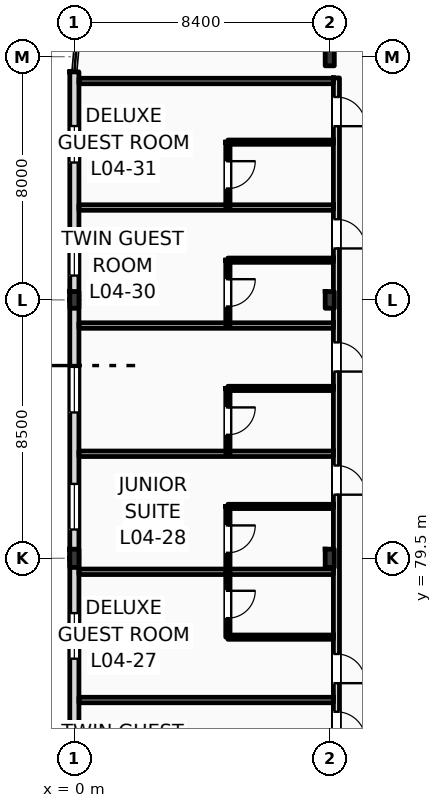
"""IFC4 building model, lengths in metres.
Left out: names, types, materials, properties, quantities, classifications, styles, units other than length and angle.
Written with IfcOpenShell. Run it as: python <this file> out.ifc"""

import sys

from ifc_helpers import new_model, si_unit, direction, frame, frame_2d, origin, origin_2d, place, context, subcontext, project, spatial, rectangle, i_section, extrude, element, fill, save


model = new_model("IFC4")
c1 = context("Model", 3, precision=1e-05, world=origin(), true_north=direction((0.0, 1.0)))
c2 = subcontext(c1, "Body", "Model", "MODEL_VIEW")
j1 = project(units=[si_unit("LENGTHUNIT", "METRE"), si_unit("PLANEANGLEUNIT", "RADIAN")], contexts=[c1])
p1 = place(None, origin())
s1 = spatial("IfcSite", under=j1, at=p1, CompositionType="ELEMENT")
p2 = place(p1, origin())
s2 = spatial("IfcBuilding", under=s1, at=p2, CompositionType="ELEMENT")
p3 = place(p2, frame((0.0, 0.0, 20.4)))
s3 = spatial("IfcBuildingStorey", under=s2, at=p3, CompositionType="ELEMENT", Elevation=20.4)
p4 = place(p3, frame((0.0, 79.5, 0.0), z_axis=(0.0, 0.0, 1.0), x_axis=(1.0, 0.0, 0.0)))
e1 = element("IfcColumn", 1, at=p4, inside=s3, PredefinedType="COLUMN", context=c2, shape_type="SweptSolid", body=[
    extrude(i_section(OverallWidth=0.3, OverallDepth=0.6, WebThickness=0.015, FlangeThickness=0.03, FilletRadius=0.027, at=origin_2d()), origin(), (0.0, 0.0, 1.0), 4.2),
])
p5 = place(p3, frame((0.0, 88.0, 0.0), z_axis=(0.0, 0.0, 1.0), x_axis=(1.0, 0.0, 0.0)))
e2 = element("IfcColumn", 2, at=p5, inside=s3, PredefinedType="COLUMN", context=c2, shape_type="SweptSolid", body=[
    extrude(i_section(OverallWidth=0.3, OverallDepth=0.55, WebThickness=0.015, FlangeThickness=0.029, FilletRadius=0.027, at=origin_2d()), origin(), (0.0, 0.0, 1.0), 4.2),
])
p6 = place(p3, frame((8.4, 79.5, 0.0), z_axis=(0.0, 0.0, 1.0), x_axis=(1.0, 0.0, 0.0)))
e3 = element("IfcColumn", 3, at=p6, inside=s3, PredefinedType="COLUMN", context=c2, shape_type="SweptSolid", body=[
    extrude(i_section(OverallWidth=0.3, OverallDepth=0.6, WebThickness=0.015, FlangeThickness=0.03, FilletRadius=0.027, at=origin_2d()), origin(), (0.0, 0.0, 1.0), 4.2),
])
p7 = place(p3, frame((8.4, 88.0, 0.0), z_axis=(0.0, 0.0, 1.0), x_axis=(1.0, 0.0, 0.0)))
e4 = element("IfcColumn", 4, at=p7, inside=s3, PredefinedType="COLUMN", context=c2, shape_type="SweptSolid", body=[
    extrude(i_section(OverallWidth=0.3, OverallDepth=0.55, WebThickness=0.015, FlangeThickness=0.029, FilletRadius=0.027, at=origin_2d()), origin(), (0.0, 0.0, 1.0), 4.2),
])
p8 = place(p3, frame((8.4, 96.0, 0.0), z_axis=(0.0, 0.0, 1.0), x_axis=(1.0, 0.0, 0.0)))
e5 = element("IfcColumn", 5, at=p8, inside=s3, PredefinedType="COLUMN", context=c2, shape_type="SweptSolid", body=[
    extrude(i_section(OverallWidth=0.3, OverallDepth=0.6, WebThickness=0.015, FlangeThickness=0.03, FilletRadius=0.027, at=origin_2d()), origin(), (0.0, 0.0, 1.0), 4.2),
])
p9 = place(p3, frame((0.0, 71.0, 0.0), z_axis=(0.0, 0.0, 1.0), x_axis=(0.0, 1.0, 0.0)))
e6 = element("IfcWall", 6, at=p9, inside=s3, PredefinedType="STANDARD", context=c2, shape_type="SweptSolid", body=[
    extrude(rectangle(XDim=8.5, YDim=0.3, at=frame_2d((4.25, 0.0))), origin(), (0.0, 0.0, 1.0), 3.53),
])
p10 = place(p9, frame((1.147, 0.0, 0.9)))
e7 = element("IfcOpeningElement", 7, at=p10, cuts=e6, PredefinedType="OPENING", context=c2, shape_type="SweptSolid", body=[
    extrude(rectangle(XDim=1.5, YDim=2.45, at=frame_2d((0.75, 1.225))), frame((0.0, 0.16, 0.0), z_axis=(0.0, -1.0, 0.0), x_axis=(1.0, 0.0, 0.0)), (0.0, 0.0, 1.0), 0.32),
])
p11 = place(p9, frame((5.197, 0.0, 0.9)))
e8 = element("IfcOpeningElement", 8, at=p11, cuts=e6, PredefinedType="OPENING", context=c2, shape_type="SweptSolid", body=[
    extrude(rectangle(XDim=1.5, YDim=2.45, at=frame_2d((0.75, 1.225))), frame((0.0, 0.16, 0.0), z_axis=(0.0, -1.0, 0.0), x_axis=(1.0, 0.0, 0.0)), (0.0, 0.0, 1.0), 0.32),
])
p12 = place(p3, frame((0.0, 79.5, 0.0), z_axis=(0.0, 0.0, 1.0), x_axis=(0.0, 1.0, 0.0)))
e9 = element("IfcWall", 9, at=p12, inside=s3, PredefinedType="STANDARD", context=c2, shape_type="SweptSolid", body=[
    extrude(rectangle(XDim=8.5, YDim=0.3, at=frame_2d((4.25, 0.0))), origin(), (0.0, 0.0, 1.0), 3.53),
])
p13 = place(p12, frame((0.947, 0.0, 0.9)))
e10 = element("IfcOpeningElement", 10, at=p13, cuts=e9, PredefinedType="OPENING", context=c2, shape_type="SweptSolid", body=[
    extrude(rectangle(XDim=1.5, YDim=2.45, at=frame_2d((0.75, 1.225))), frame((0.0, 0.16, 0.0), z_axis=(0.0, -1.0, 0.0), x_axis=(1.0, 0.0, 0.0)), (0.0, 0.0, 1.0), 0.32),
])
p14 = place(p12, frame((4.797, 0.0, 0.9)))
e11 = element("IfcOpeningElement", 11, at=p14, cuts=e9, PredefinedType="OPENING", context=c2, shape_type="SweptSolid", body=[
    extrude(rectangle(XDim=1.5, YDim=2.45, at=frame_2d((0.75, 1.225))), frame((0.0, 0.16, 0.0), z_axis=(0.0, -1.0, 0.0), x_axis=(1.0, 0.0, 0.0)), (0.0, 0.0, 1.0), 0.32),
])
p15 = place(p3, frame((0.0, 88.0, 0.0), z_axis=(0.0, 0.0, 1.0), x_axis=(0.0, 1.0, 0.0)))
e12 = element("IfcWall", 12, at=p15, inside=s3, PredefinedType="STANDARD", context=c2, shape_type="SweptSolid", body=[
    extrude(rectangle(XDim=7.5, YDim=0.3, at=frame_2d((3.75, 0.0))), origin(), (0.0, 0.0, 1.0), 3.94),
])
p16 = place(p15, frame((0.8, 0.0, 0.9)))
e13 = element("IfcOpeningElement", 13, at=p16, cuts=e12, PredefinedType="OPENING", context=c2, shape_type="SweptSolid", body=[
    extrude(rectangle(XDim=1.5, YDim=2.86, at=frame_2d((0.75, 1.43))), frame((0.0, 0.16, 0.0), z_axis=(0.0, -1.0, 0.0), x_axis=(1.0, 0.0, 0.0)), (0.0, 0.0, 1.0), 0.32),
])
p17 = place(p15, frame((4.519, 0.0, 0.9)))
e14 = element("IfcOpeningElement", 14, at=p17, cuts=e12, PredefinedType="OPENING", context=c2, shape_type="SweptSolid", body=[
    extrude(rectangle(XDim=1.2, YDim=1.8, at=frame_2d((0.6, 0.9))), frame((0.0, 0.16, 0.0), z_axis=(0.0, -1.0, 0.0), x_axis=(1.0, 0.0, 0.0)), (0.0, 0.0, 1.0), 0.32),
])
p18 = place(p3, frame((8.62, 62.64, 0.0), z_axis=(0.0, 0.0, 1.0), x_axis=(0.0, 1.0, 0.0)))
e15 = element("IfcWall", 15, at=p18, inside=s3, PredefinedType="PARTITIONING", context=c2, shape_type="SweptSolid", body=[
    extrude(rectangle(XDim=32.66, YDim=0.2, at=frame_2d((16.33, 0.0))), origin(), (0.0, 0.0, 1.0), 3.53),
])
p19 = place(p18, frame((2.724, 0.0, 0.0)))
e16 = element("IfcOpeningElement", 16, at=p19, cuts=e15, PredefinedType="OPENING", context=c2, shape_type="SweptSolid", body=[
    extrude(rectangle(XDim=0.96, YDim=2.2, at=frame_2d((0.48, 1.1))), frame((0.0, 0.11, 0.0), z_axis=(0.0, -1.0, 0.0), x_axis=(1.0, 0.0, 0.0)), (0.0, 0.0, 1.0), 0.22),
])
p20 = place(p18, frame((4.652, 0.0, 0.0)))
e17 = element("IfcOpeningElement", 17, at=p20, cuts=e15, PredefinedType="OPENING", context=c2, shape_type="SweptSolid", body=[
    extrude(rectangle(XDim=0.96, YDim=2.2, at=frame_2d((0.48, 1.1))), frame((0.0, 0.11, 0.0), z_axis=(0.0, -1.0, 0.0), x_axis=(1.0, 0.0, 0.0)), (0.0, 0.0, 1.0), 0.22),
])
p21 = place(p18, frame((10.852, 0.0, 0.0)))
e18 = element("IfcOpeningElement", 18, at=p21, cuts=e15, PredefinedType="OPENING", context=c2, shape_type="SweptSolid", body=[
    extrude(rectangle(XDim=0.96, YDim=2.2, at=frame_2d((0.48, 1.1))), frame((0.0, 0.11, 0.0), z_axis=(0.0, -1.0, 0.0), x_axis=(1.0, 0.0, 0.0)), (0.0, 0.0, 1.0), 0.22),
])
p22 = place(p18, frame((12.752, 0.0, 0.0)))
e19 = element("IfcOpeningElement", 19, at=p22, cuts=e15, PredefinedType="OPENING", context=c2, shape_type="SweptSolid", body=[
    extrude(rectangle(XDim=0.96, YDim=2.2, at=frame_2d((0.48, 1.1))), frame((0.0, 0.11, 0.0), z_axis=(0.0, -1.0, 0.0), x_axis=(1.0, 0.0, 0.0)), (0.0, 0.0, 1.0), 0.22),
])
p23 = place(p18, frame((18.952, 0.0, 0.0)))
e20 = element("IfcOpeningElement", 20, at=p23, cuts=e15, PredefinedType="OPENING", context=c2, shape_type="SweptSolid", body=[
    extrude(rectangle(XDim=0.96, YDim=2.2, at=frame_2d((0.48, 1.1))), frame((0.0, 0.11, 0.0), z_axis=(0.0, -1.0, 0.0), x_axis=(1.0, 0.0, 0.0)), (0.0, 0.0, 1.0), 0.22),
])
p24 = place(p18, frame((23.002, 0.0, 0.0)))
e21 = element("IfcOpeningElement", 21, at=p24, cuts=e15, PredefinedType="OPENING", context=c2, shape_type="SweptSolid", body=[
    extrude(rectangle(XDim=0.96, YDim=2.2, at=frame_2d((0.48, 1.1))), frame((0.0, 0.11, 0.0), z_axis=(0.0, -1.0, 0.0), x_axis=(1.0, 0.0, 0.0)), (0.0, 0.0, 1.0), 0.22),
])
p25 = place(p18, frame((27.052, 0.0, 0.0)))
e22 = element("IfcOpeningElement", 22, at=p25, cuts=e15, PredefinedType="OPENING", context=c2, shape_type="SweptSolid", body=[
    extrude(rectangle(XDim=0.96, YDim=2.2, at=frame_2d((0.48, 1.1))), frame((0.0, 0.11, 0.0), z_axis=(0.0, -1.0, 0.0), x_axis=(1.0, 0.0, 0.0)), (0.0, 0.0, 1.0), 0.22),
])
p26 = place(p18, frame((31.074, 0.0, 0.0)))
e23 = element("IfcOpeningElement", 23, at=p26, cuts=e15, PredefinedType="OPENING", context=c2, shape_type="SweptSolid", body=[
    extrude(rectangle(XDim=0.96, YDim=2.2, at=frame_2d((0.48, 1.1))), frame((0.0, 0.11, 0.0), z_axis=(0.0, -1.0, 0.0), x_axis=(1.0, 0.0, 0.0)), (0.0, 0.0, 1.0), 0.22),
])
for number, where, z_axis, x_axis in (
    (24, (0.15, 74.838, 0.0), (0.0, 0.0, 1.0), (1.0, 0.0, 0.0)),
    (25, (0.15, 79.056, 0.0), (0.0, 0.0, 1.0), (1.0, 0.0, 0.0)),
):
    element("IfcWall", number, at=place(p3, frame(where, z_axis=z_axis, x_axis=x_axis)), inside=s3, PredefinedType="PARTITIONING", context=c2, shape_type="SweptSolid", body=[
        extrude(rectangle(XDim=8.37, YDim=0.18, at=frame_2d((4.185, 0.0))), origin(), (0.0, 0.0, 1.0), 3.94),
    ])
p27 = place(p3, frame((5.05, 76.906, 0.0), z_axis=(0.0, 0.0, 1.0), x_axis=(1.0, 0.0, 0.0)))
e26 = element("IfcWall", 26, at=p27, inside=s3, PredefinedType="PARTITIONING", context=c2, shape_type="SweptSolid", body=[
    extrude(rectangle(XDim=3.47, YDim=0.14, at=frame_2d((1.735, 0.0))), origin(), (0.0, 0.0, 1.0), 3.94),
])
p28 = place(p3, frame((5.05, 76.906, 0.0), z_axis=(0.0, 0.0, 1.0), x_axis=(0.0, 1.0, 0.0)))
e27 = element("IfcWall", 27, at=p28, inside=s3, PredefinedType="PARTITIONING", context=c2, shape_type="SweptSolid", body=[
    extrude(rectangle(XDim=2.15, YDim=0.14, at=frame_2d((1.075, 0.0))), origin(), (0.0, 0.0, 1.0), 3.94),
])
p29 = place(p28, frame((0.625, 0.0, 0.0)))
e28 = element("IfcOpeningElement", 28, at=p29, cuts=e27, PredefinedType="OPENING", context=c2, shape_type="SweptSolid", body=[
    extrude(rectangle(XDim=0.9, YDim=2.1, at=frame_2d((0.45, 1.05))), frame((0.0, 0.08, 0.0), z_axis=(0.0, -1.0, 0.0), x_axis=(1.0, 0.0, 0.0)), (0.0, 0.0, 1.0), 0.16),
])
p30 = place(p3, frame((0.15, 82.938, 0.0), z_axis=(0.0, 0.0, 1.0), x_axis=(1.0, 0.0, 0.0)))
e29 = element("IfcWall", 29, at=p30, inside=s3, PredefinedType="PARTITIONING", context=c2, shape_type="SweptSolid", body=[
    extrude(rectangle(XDim=8.37, YDim=0.18, at=frame_2d((4.185, 0.0))), origin(), (0.0, 0.0, 1.0), 3.94),
])
p31 = place(p3, frame((5.05, 81.206, 0.0), z_axis=(0.0, 0.0, 1.0), x_axis=(1.0, 0.0, 0.0)))
e30 = element("IfcWall", 30, at=p31, inside=s3, PredefinedType="PARTITIONING", context=c2, shape_type="SweptSolid", body=[
    extrude(rectangle(XDim=3.47, YDim=0.14, at=frame_2d((1.735, 0.0))), origin(), (0.0, 0.0, 1.0), 3.94),
])
p32 = place(p3, frame((5.05, 79.056, 0.0), z_axis=(0.0, 0.0, 1.0), x_axis=(0.0, 1.0, 0.0)))
e31 = element("IfcWall", 31, at=p32, inside=s3, PredefinedType="PARTITIONING", context=c2, shape_type="SweptSolid", body=[
    extrude(rectangle(XDim=2.15, YDim=0.14, at=frame_2d((1.075, 0.0))), origin(), (0.0, 0.0, 1.0), 3.94),
])
p33 = place(p32, frame((0.625, 0.0, 0.0)))
e32 = element("IfcOpeningElement", 32, at=p33, cuts=e31, PredefinedType="OPENING", context=c2, shape_type="SweptSolid", body=[
    extrude(rectangle(XDim=0.9, YDim=2.1, at=frame_2d((0.45, 1.05))), frame((0.0, 0.08, 0.0), z_axis=(0.0, -1.0, 0.0), x_axis=(1.0, 0.0, 0.0)), (0.0, 0.0, 1.0), 0.16),
])
p34 = place(p3, frame((0.15, 87.156, 0.0), z_axis=(0.0, 0.0, 1.0), x_axis=(1.0, 0.0, 0.0)))
e33 = element("IfcWall", 33, at=p34, inside=s3, PredefinedType="PARTITIONING", context=c2, shape_type="SweptSolid", body=[
    extrude(rectangle(XDim=8.37, YDim=0.18, at=frame_2d((4.185, 0.0))), origin(), (0.0, 0.0, 1.0), 3.94),
])
p35 = place(p3, frame((5.05, 85.088, 0.0), z_axis=(0.0, 0.0, 1.0), x_axis=(1.0, 0.0, 0.0)))
e34 = element("IfcWall", 34, at=p35, inside=s3, PredefinedType="PARTITIONING", context=c2, shape_type="SweptSolid", body=[
    extrude(rectangle(XDim=3.47, YDim=0.14, at=frame_2d((1.735, 0.0))), origin(), (0.0, 0.0, 1.0), 3.94),
])
p36 = place(p3, frame((5.05, 82.938, 0.0), z_axis=(0.0, 0.0, 1.0), x_axis=(0.0, 1.0, 0.0)))
e35 = element("IfcWall", 35, at=p36, inside=s3, PredefinedType="PARTITIONING", context=c2, shape_type="SweptSolid", body=[
    extrude(rectangle(XDim=2.15, YDim=0.14, at=frame_2d((1.075, 0.0))), origin(), (0.0, 0.0, 1.0), 3.94),
])
p37 = place(p36, frame((0.625, 0.0, 0.0)))
e36 = element("IfcOpeningElement", 36, at=p37, cuts=e35, PredefinedType="OPENING", context=c2, shape_type="SweptSolid", body=[
    extrude(rectangle(XDim=0.9, YDim=2.1, at=frame_2d((0.45, 1.05))), frame((0.0, 0.08, 0.0), z_axis=(0.0, -1.0, 0.0), x_axis=(1.0, 0.0, 0.0)), (0.0, 0.0, 1.0), 0.16),
])
p38 = place(p3, frame((0.15, 91.038, 0.0), z_axis=(0.0, 0.0, 1.0), x_axis=(1.0, 0.0, 0.0)))
e37 = element("IfcWall", 37, at=p38, inside=s3, PredefinedType="PARTITIONING", context=c2, shape_type="SweptSolid", body=[
    extrude(rectangle(XDim=8.37, YDim=0.18, at=frame_2d((4.185, 0.0))), origin(), (0.0, 0.0, 1.0), 3.94),
])
p39 = place(p3, frame((5.05, 89.306, 0.0), z_axis=(0.0, 0.0, 1.0), x_axis=(1.0, 0.0, 0.0)))
e38 = element("IfcWall", 38, at=p39, inside=s3, PredefinedType="PARTITIONING", context=c2, shape_type="SweptSolid", body=[
    extrude(rectangle(XDim=3.47, YDim=0.14, at=frame_2d((1.735, 0.0))), origin(), (0.0, 0.0, 1.0), 3.94),
])
p40 = place(p3, frame((5.05, 87.156, 0.0), z_axis=(0.0, 0.0, 1.0), x_axis=(0.0, 1.0, 0.0)))
e39 = element("IfcWall", 39, at=p40, inside=s3, PredefinedType="PARTITIONING", context=c2, shape_type="SweptSolid", body=[
    extrude(rectangle(XDim=2.15, YDim=0.14, at=frame_2d((1.075, 0.0))), origin(), (0.0, 0.0, 1.0), 3.94),
])
p41 = place(p40, frame((0.625, 0.0, 0.0)))
e40 = element("IfcOpeningElement", 40, at=p41, cuts=e39, PredefinedType="OPENING", context=c2, shape_type="SweptSolid", body=[
    extrude(rectangle(XDim=0.9, YDim=2.1, at=frame_2d((0.45, 1.05))), frame((0.0, 0.08, 0.0), z_axis=(0.0, -1.0, 0.0), x_axis=(1.0, 0.0, 0.0)), (0.0, 0.0, 1.0), 0.16),
])
p42 = place(p3, frame((0.15, 95.2, 0.0), z_axis=(0.0, 0.0, 1.0), x_axis=(1.0, 0.0, 0.0)))
e41 = element("IfcWall", 41, at=p42, inside=s3, PredefinedType="PARTITIONING", context=c2, shape_type="SweptSolid", body=[
    extrude(rectangle(XDim=8.37, YDim=0.18, at=frame_2d((4.185, 0.0))), origin(), (0.0, 0.0, 1.0), 3.94),
])
p43 = place(p3, frame((5.05, 93.188, 0.0), z_axis=(0.0, 0.0, 1.0), x_axis=(1.0, 0.0, 0.0)))
e42 = element("IfcWall", 42, at=p43, inside=s3, PredefinedType="PARTITIONING", context=c2, shape_type="SweptSolid", body=[
    extrude(rectangle(XDim=3.47, YDim=0.14, at=frame_2d((1.735, 0.0))), origin(), (0.0, 0.0, 1.0), 3.94),
])
p44 = place(p3, frame((5.05, 91.038, 0.0), z_axis=(0.0, 0.0, 1.0), x_axis=(0.0, 1.0, 0.0)))
e43 = element("IfcWall", 43, at=p44, inside=s3, PredefinedType="PARTITIONING", context=c2, shape_type="SweptSolid", body=[
    extrude(rectangle(XDim=2.15, YDim=0.14, at=frame_2d((1.075, 0.0))), origin(), (0.0, 0.0, 1.0), 3.94),
])
p45 = place(p44, frame((0.625, 0.0, 0.0)))
e44 = element("IfcOpeningElement", 44, at=p45, cuts=e43, PredefinedType="OPENING", context=c2, shape_type="SweptSolid", body=[
    extrude(rectangle(XDim=0.9, YDim=2.1, at=frame_2d((0.45, 1.05))), frame((0.0, 0.08, 0.0), z_axis=(0.0, -1.0, 0.0), x_axis=(1.0, 0.0, 0.0)), (0.0, 0.0, 1.0), 0.16),
])
p46 = place(p11, origin())
e45 = element("IfcWindow", 45, at=p46, inside=s3, PartitioningType="DOUBLE_PANEL_VERTICAL", PredefinedType="WINDOW", context=c2, shape_type="SweptSolid", body=[
    extrude(rectangle(XDim=1.5, YDim=2.45, at=frame_2d((0.75, 1.225))), frame((0.0, 0.03, 0.0), z_axis=(0.0, -1.0, 0.0), x_axis=(1.0, 0.0, 0.0)), (0.0, 0.0, 1.0), 0.06),
])
fill(e8, e45)
p47 = place(p13, origin())
e46 = element("IfcWindow", 46, at=p47, inside=s3, PartitioningType="DOUBLE_PANEL_VERTICAL", PredefinedType="WINDOW", context=c2, shape_type="SweptSolid", body=[
    extrude(rectangle(XDim=1.5, YDim=2.45, at=frame_2d((0.75, 1.225))), frame((0.0, 0.03, 0.0), z_axis=(0.0, -1.0, 0.0), x_axis=(1.0, 0.0, 0.0)), (0.0, 0.0, 1.0), 0.06),
])
fill(e10, e46)
p48 = place(p14, origin())
e47 = element("IfcWindow", 47, at=p48, inside=s3, PartitioningType="DOUBLE_PANEL_VERTICAL", PredefinedType="WINDOW", context=c2, shape_type="SweptSolid", body=[
    extrude(rectangle(XDim=1.5, YDim=2.45, at=frame_2d((0.75, 1.225))), frame((0.0, 0.03, 0.0), z_axis=(0.0, -1.0, 0.0), x_axis=(1.0, 0.0, 0.0)), (0.0, 0.0, 1.0), 0.06),
])
fill(e11, e47)
p49 = place(p16, origin())
e48 = element("IfcWindow", 48, at=p49, inside=s3, PartitioningType="DOUBLE_PANEL_VERTICAL", PredefinedType="WINDOW", context=c2, shape_type="SweptSolid", body=[
    extrude(rectangle(XDim=1.5, YDim=2.86, at=frame_2d((0.75, 1.43))), frame((0.0, 0.03, 0.0), z_axis=(0.0, -1.0, 0.0), x_axis=(1.0, 0.0, 0.0)), (0.0, 0.0, 1.0), 0.06),
])
fill(e13, e48)
p50 = place(p17, origin())
e49 = element("IfcWindow", 49, at=p50, inside=s3, PartitioningType="DOUBLE_PANEL_VERTICAL", PredefinedType="WINDOW", context=c2, shape_type="SweptSolid", body=[
    extrude(rectangle(XDim=1.2, YDim=1.8, at=frame_2d((0.6, 0.9))), frame((0.0, 0.03, 0.0), z_axis=(0.0, -1.0, 0.0), x_axis=(1.0, 0.0, 0.0)), (0.0, 0.0, 1.0), 0.06),
])
fill(e14, e49)
p51 = place(p21, frame((0.96, 0.0, 0.0), z_axis=(0.0, 0.0, 1.0), x_axis=(-1.0, 0.0, 0.0)))
e50 = element("IfcDoor", 50, at=p51, inside=s3, OperationType="SINGLE_SWING_LEFT", PredefinedType="DOOR", context=c2, shape_type="SweptSolid", body=[
    extrude(rectangle(XDim=0.96, YDim=2.2, at=frame_2d((0.48, 1.1))), frame((0.0, 0.025, 0.0), z_axis=(0.0, -1.0, 0.0), x_axis=(1.0, 0.0, 0.0)), (0.0, 0.0, 1.0), 0.05),
])
fill(e18, e50)
p52 = place(p22, frame((0.96, 0.0, 0.0), z_axis=(0.0, 0.0, 1.0), x_axis=(-1.0, 0.0, 0.0)))
e51 = element("IfcDoor", 51, at=p52, inside=s3, OperationType="SINGLE_SWING_LEFT", PredefinedType="DOOR", context=c2, shape_type="SweptSolid", body=[
    extrude(rectangle(XDim=0.96, YDim=2.2, at=frame_2d((0.48, 1.1))), frame((0.0, 0.025, 0.0), z_axis=(0.0, -1.0, 0.0), x_axis=(1.0, 0.0, 0.0)), (0.0, 0.0, 1.0), 0.05),
])
fill(e19, e51)
p53 = place(p29, frame((0.9, 0.0, 0.0), z_axis=(0.0, 0.0, 1.0), x_axis=(-1.0, 0.0, 0.0)))
e52 = element("IfcDoor", 52, at=p53, inside=s3, OperationType="SINGLE_SWING_RIGHT", PredefinedType="DOOR", context=c2, shape_type="SweptSolid", body=[
    extrude(rectangle(XDim=0.9, YDim=2.1, at=frame_2d((0.45, 1.05))), frame((0.0, 0.025, 0.0), z_axis=(0.0, -1.0, 0.0), x_axis=(1.0, 0.0, 0.0)), (0.0, 0.0, 1.0), 0.05),
])
fill(e28, e52)
p54 = place(p23, frame((0.96, 0.0, 0.0), z_axis=(0.0, 0.0, 1.0), x_axis=(-1.0, 0.0, 0.0)))
e53 = element("IfcDoor", 53, at=p54, inside=s3, OperationType="SINGLE_SWING_LEFT", PredefinedType="DOOR", context=c2, shape_type="SweptSolid", body=[
    extrude(rectangle(XDim=0.96, YDim=2.2, at=frame_2d((0.48, 1.1))), frame((0.0, 0.025, 0.0), z_axis=(0.0, -1.0, 0.0), x_axis=(1.0, 0.0, 0.0)), (0.0, 0.0, 1.0), 0.05),
])
fill(e20, e53)
p55 = place(p33, frame((0.9, 0.0, 0.0), z_axis=(0.0, 0.0, 1.0), x_axis=(-1.0, 0.0, 0.0)))
e54 = element("IfcDoor", 54, at=p55, inside=s3, OperationType="SINGLE_SWING_RIGHT", PredefinedType="DOOR", context=c2, shape_type="SweptSolid", body=[
    extrude(rectangle(XDim=0.9, YDim=2.1, at=frame_2d((0.45, 1.05))), frame((0.0, 0.025, 0.0), z_axis=(0.0, -1.0, 0.0), x_axis=(1.0, 0.0, 0.0)), (0.0, 0.0, 1.0), 0.05),
])
fill(e32, e54)
p56 = place(p24, frame((0.96, 0.0, 0.0), z_axis=(0.0, 0.0, 1.0), x_axis=(-1.0, 0.0, 0.0)))
e55 = element("IfcDoor", 55, at=p56, inside=s3, OperationType="SINGLE_SWING_LEFT", PredefinedType="DOOR", context=c2, shape_type="SweptSolid", body=[
    extrude(rectangle(XDim=0.96, YDim=2.2, at=frame_2d((0.48, 1.1))), frame((0.0, 0.025, 0.0), z_axis=(0.0, -1.0, 0.0), x_axis=(1.0, 0.0, 0.0)), (0.0, 0.0, 1.0), 0.05),
])
fill(e21, e55)
p57 = place(p37, frame((0.9, 0.0, 0.0), z_axis=(0.0, 0.0, 1.0), x_axis=(-1.0, 0.0, 0.0)))
e56 = element("IfcDoor", 56, at=p57, inside=s3, OperationType="SINGLE_SWING_RIGHT", PredefinedType="DOOR", context=c2, shape_type="SweptSolid", body=[
    extrude(rectangle(XDim=0.9, YDim=2.1, at=frame_2d((0.45, 1.05))), frame((0.0, 0.025, 0.0), z_axis=(0.0, -1.0, 0.0), x_axis=(1.0, 0.0, 0.0)), (0.0, 0.0, 1.0), 0.05),
])
fill(e36, e56)
p58 = place(p25, frame((0.96, 0.0, 0.0), z_axis=(0.0, 0.0, 1.0), x_axis=(-1.0, 0.0, 0.0)))
e57 = element("IfcDoor", 57, at=p58, inside=s3, OperationType="SINGLE_SWING_LEFT", PredefinedType="DOOR", context=c2, shape_type="SweptSolid", body=[
    extrude(rectangle(XDim=0.96, YDim=2.2, at=frame_2d((0.48, 1.1))), frame((0.0, 0.025, 0.0), z_axis=(0.0, -1.0, 0.0), x_axis=(1.0, 0.0, 0.0)), (0.0, 0.0, 1.0), 0.05),
])
fill(e22, e57)
p59 = place(p41, frame((0.9, 0.0, 0.0), z_axis=(0.0, 0.0, 1.0), x_axis=(-1.0, 0.0, 0.0)))
e58 = element("IfcDoor", 58, at=p59, inside=s3, OperationType="SINGLE_SWING_RIGHT", PredefinedType="DOOR", context=c2, shape_type="SweptSolid", body=[
    extrude(rectangle(XDim=0.9, YDim=2.1, at=frame_2d((0.45, 1.05))), frame((0.0, 0.025, 0.0), z_axis=(0.0, -1.0, 0.0), x_axis=(1.0, 0.0, 0.0)), (0.0, 0.0, 1.0), 0.05),
])
fill(e40, e58)
p60 = place(p26, frame((0.96, 0.0, 0.0), z_axis=(0.0, 0.0, 1.0), x_axis=(-1.0, 0.0, 0.0)))
e59 = element("IfcDoor", 59, at=p60, inside=s3, OperationType="SINGLE_SWING_LEFT", PredefinedType="DOOR", context=c2, shape_type="SweptSolid", body=[
    extrude(rectangle(XDim=0.96, YDim=2.2, at=frame_2d((0.48, 1.1))), frame((0.0, 0.025, 0.0), z_axis=(0.0, -1.0, 0.0), x_axis=(1.0, 0.0, 0.0)), (0.0, 0.0, 1.0), 0.05),
])
fill(e23, e59)
p61 = place(p45, frame((0.9, 0.0, 0.0), z_axis=(0.0, 0.0, 1.0), x_axis=(-1.0, 0.0, 0.0)))
e60 = element("IfcDoor", 60, at=p61, inside=s3, OperationType="SINGLE_SWING_RIGHT", PredefinedType="DOOR", context=c2, shape_type="SweptSolid", body=[
    extrude(rectangle(XDim=0.9, YDim=2.1, at=frame_2d((0.45, 1.05))), frame((0.0, 0.025, 0.0), z_axis=(0.0, -1.0, 0.0), x_axis=(1.0, 0.0, 0.0)), (0.0, 0.0, 1.0), 0.05),
])
fill(e44, e60)
save(model, sys.argv[1])
